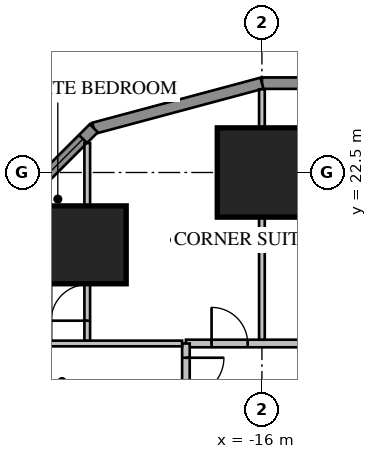
"""IFC4 building model, lengths in metres.
Left out: names, types, materials, properties, quantities, classifications, styles, units other than length and angle.
Written with IfcOpenShell. Run it as: python <this file> out.ifc"""

import sys

from ifc_helpers import new_model, si_unit, direction, frame, frame_2d, origin, origin_2d, place, context, subcontext, project, spatial, rectangle, extrude, element, fill, save


model = new_model("IFC4")
c1 = context("Model", 3, precision=1e-05, world=origin(), true_north=direction((0.0, 1.0)))
c2 = subcontext(c1, "Body", "Model", "MODEL_VIEW")
j1 = project(units=[si_unit("LENGTHUNIT", "METRE"), si_unit("PLANEANGLEUNIT", "RADIAN")], contexts=[c1])
p1 = place(None, origin())
s1 = spatial("IfcSite", under=j1, at=p1, CompositionType="ELEMENT")
p2 = place(p1, origin())
s2 = spatial("IfcBuilding", under=s1, at=p2, CompositionType="ELEMENT")
p3 = place(p2, frame((0.0, 0.0, 27.55)))
s3 = spatial("IfcBuildingStorey", under=s2, at=p3, CompositionType="ELEMENT", Elevation=27.55)
p4 = place(p3, frame((-16.0, 22.5, 0.0), z_axis=(0.0, 0.0, 1.0), x_axis=(1.0, 0.0, 0.0)))
e1 = element("IfcColumn", 1, at=p4, inside=s3, PredefinedType="COLUMN", context=c2, shape_type="SweptSolid", body=[
    extrude(rectangle(XDim=2.35, YDim=2.35, at=origin_2d()), origin(), (0.0, 0.0, 1.0), 3.85),
])
p5 = place(p3, frame((-20.596, 20.596, 0.0), z_axis=(0.0, 0.0, 1.0), x_axis=(1.0, 0.0, 0.0)))
e2 = element("IfcColumn", 2, at=p5, inside=s3, PredefinedType="COLUMN", context=c2, shape_type="SweptSolid", body=[
    extrude(rectangle(XDim=2.05, YDim=2.05, at=origin_2d()), origin(), (0.0, 0.0, 1.0), 3.85),
])
p6 = place(p3, frame((16.0, 24.85, 0.0), z_axis=(0.0, 0.0, 1.0), x_axis=(-1.0, 0.0, 0.0)))
e3 = element("IfcWall", 3, at=p6, inside=s3, PredefinedType="SOLIDWALL", context=c2, shape_type="SweptSolid", body=[
    extrude(rectangle(XDim=32.0, YDim=0.3, at=frame_2d((16.0, 0.0))), origin(), (0.0, 0.0, 1.0), 3.65),
])
p7 = place(p6, frame((1.2, 0.0, 0.75)))
e4 = element("IfcOpeningElement", 4, at=p7, cuts=e3, PredefinedType="OPENING", context=c2, shape_type="SweptSolid", body=[
    extrude(rectangle(XDim=1.6, YDim=1.8, at=frame_2d((0.8, 0.9))), frame((0.0, 0.17, 0.0), z_axis=(0.0, -1.0, 0.0), x_axis=(1.0, 0.0, 0.0)), (0.0, 0.0, 1.0), 0.34),
])
p8 = place(p6, frame((5.2, 0.0, 0.75)))
e5 = element("IfcOpeningElement", 5, at=p8, cuts=e3, PredefinedType="OPENING", context=c2, shape_type="SweptSolid", body=[
    extrude(rectangle(XDim=1.6, YDim=1.8, at=frame_2d((0.8, 0.9))), frame((0.0, 0.17, 0.0), z_axis=(0.0, -1.0, 0.0), x_axis=(1.0, 0.0, 0.0)), (0.0, 0.0, 1.0), 0.34),
])
p9 = place(p6, frame((17.2, 0.0, 0.75)))
e6 = element("IfcOpeningElement", 6, at=p9, cuts=e3, PredefinedType="OPENING", context=c2, shape_type="SweptSolid", body=[
    extrude(rectangle(XDim=1.6, YDim=1.8, at=frame_2d((0.8, 0.9))), frame((0.0, 0.17, 0.0), z_axis=(0.0, -1.0, 0.0), x_axis=(1.0, 0.0, 0.0)), (0.0, 0.0, 1.0), 0.34),
])
p10 = place(p6, frame((21.2, 0.0, 0.75)))
e7 = element("IfcOpeningElement", 7, at=p10, cuts=e3, PredefinedType="OPENING", context=c2, shape_type="SweptSolid", body=[
    extrude(rectangle(XDim=1.6, YDim=1.8, at=frame_2d((0.8, 0.9))), frame((0.0, 0.17, 0.0), z_axis=(0.0, -1.0, 0.0), x_axis=(1.0, 0.0, 0.0)), (0.0, 0.0, 1.0), 0.34),
])
p11 = place(p6, frame((25.2, 0.0, 0.75)))
e8 = element("IfcOpeningElement", 8, at=p11, cuts=e3, PredefinedType="OPENING", context=c2, shape_type="SweptSolid", body=[
    extrude(rectangle(XDim=1.6, YDim=1.8, at=frame_2d((0.8, 0.9))), frame((0.0, 0.17, 0.0), z_axis=(0.0, -1.0, 0.0), x_axis=(1.0, 0.0, 0.0)), (0.0, 0.0, 1.0), 0.34),
])
p12 = place(p6, frame((29.2, 0.0, 0.75)))
e9 = element("IfcOpeningElement", 9, at=p12, cuts=e3, PredefinedType="OPENING", context=c2, shape_type="SweptSolid", body=[
    extrude(rectangle(XDim=1.6, YDim=1.8, at=frame_2d((0.8, 0.9))), frame((0.0, 0.17, 0.0), z_axis=(0.0, -1.0, 0.0), x_axis=(1.0, 0.0, 0.0)), (0.0, 0.0, 1.0), 0.34),
])
p13 = place(p6, frame((8.8, 0.0, 0.75)))
e10 = element("IfcOpeningElement", 10, at=p13, cuts=e3, PredefinedType="OPENING", context=c2, shape_type="SweptSolid", body=[
    extrude(rectangle(XDim=2.4, YDim=1.8, at=frame_2d((1.2, 0.9))), frame((0.0, 0.17, 0.0), z_axis=(0.0, -1.0, 0.0), x_axis=(1.0, 0.0, 0.0)), (0.0, 0.0, 1.0), 0.34),
])
p14 = place(p6, frame((13.812, 0.0, 0.0)))
e11 = element("IfcOpeningElement", 11, at=p14, cuts=e3, PredefinedType="OPENING", context=c2, shape_type="SweptSolid", body=[
    extrude(rectangle(XDim=1.0, YDim=2.4, at=frame_2d((0.5, 1.2))), frame((0.0, 0.17, 0.0), z_axis=(0.0, -1.0, 0.0), x_axis=(1.0, 0.0, 0.0)), (0.0, 0.0, 1.0), 0.34),
])
p15 = place(p3, frame((-16.0, 24.85, 0.0), z_axis=(0.0, 0.0, 1.0), x_axis=(-0.965920218567, -0.258839972501, 0.0)))
e12 = element("IfcWall", 12, at=p15, inside=s3, PredefinedType="SOLIDWALL", context=c2, shape_type="SweptSolid", body=[
    extrude(rectangle(XDim=4.581, YDim=0.3, at=frame_2d((2.291, 0.0))), origin(), (0.0, 0.0, 1.0), 3.65),
])
p16 = place(p3, frame((-20.425, 23.664, 0.0), z_axis=(0.0, 0.0, 1.0), x_axis=(-0.707106781187, -0.707106781187, 0.0)))
e13 = element("IfcWall", 13, at=p16, inside=s3, PredefinedType="SOLIDWALL", context=c2, shape_type="SweptSolid", body=[
    extrude(rectangle(XDim=4.581, YDim=0.3, at=frame_2d((2.291, 0.0))), origin(), (0.0, 0.0, 1.0), 3.65),
])
p17 = place(p16, frame((0.4, 0.0, 0.75)))
e14 = element("IfcOpeningElement", 14, at=p17, cuts=e13, PredefinedType="OPENING", context=c2, shape_type="SweptSolid", body=[
    extrude(rectangle(XDim=3.781, YDim=1.8, at=frame_2d((1.891, 0.9))), frame((0.0, 0.17, 0.0), z_axis=(0.0, -1.0, 0.0), x_axis=(1.0, 0.0, 0.0)), (0.0, 0.0, 1.0), 0.34),
])
p18 = place(p3, frame((18.0, 18.0, 0.0), z_axis=(0.0, 0.0, 1.0), x_axis=(-1.0, 0.0, 0.0)))
e15 = element("IfcWall", 15, at=p18, inside=s3, PredefinedType="PARTITIONING", context=c2, shape_type="SweptSolid", body=[
    extrude(rectangle(XDim=36.0, YDim=0.2, at=frame_2d((18.0, 0.0))), origin(), (0.0, 0.0, 1.0), 3.65),
])
p19 = place(p18, frame((0.375, 0.0, 0.0)))
e16 = element("IfcOpeningElement", 16, at=p19, cuts=e15, PredefinedType="OPENING", context=c2, shape_type="SweptSolid", body=[
    extrude(rectangle(XDim=1.0, YDim=2.1, at=frame_2d((0.5, 1.05))), frame((0.0, 0.12, 0.0), z_axis=(0.0, -1.0, 0.0), x_axis=(1.0, 0.0, 0.0)), (0.0, 0.0, 1.0), 0.24),
])
p20 = place(p18, frame((3.8, 0.0, 0.0)))
e17 = element("IfcOpeningElement", 17, at=p20, cuts=e15, PredefinedType="OPENING", context=c2, shape_type="SweptSolid", body=[
    extrude(rectangle(XDim=0.95, YDim=2.1, at=frame_2d((0.475, 1.05))), frame((0.0, 0.12, 0.0), z_axis=(0.0, -1.0, 0.0), x_axis=(1.0, 0.0, 0.0)), (0.0, 0.0, 1.0), 0.24),
])
p21 = place(p18, frame((7.8, 0.0, 0.0)))
e18 = element("IfcOpeningElement", 18, at=p21, cuts=e15, PredefinedType="OPENING", context=c2, shape_type="SweptSolid", body=[
    extrude(rectangle(XDim=0.95, YDim=2.1, at=frame_2d((0.475, 1.05))), frame((0.0, 0.12, 0.0), z_axis=(0.0, -1.0, 0.0), x_axis=(1.0, 0.0, 0.0)), (0.0, 0.0, 1.0), 0.24),
])
p22 = place(p18, frame((19.8, 0.0, 0.0)))
e19 = element("IfcOpeningElement", 19, at=p22, cuts=e15, PredefinedType="OPENING", context=c2, shape_type="SweptSolid", body=[
    extrude(rectangle(XDim=0.95, YDim=2.1, at=frame_2d((0.475, 1.05))), frame((0.0, 0.12, 0.0), z_axis=(0.0, -1.0, 0.0), x_axis=(1.0, 0.0, 0.0)), (0.0, 0.0, 1.0), 0.24),
])
p23 = place(p18, frame((23.8, 0.0, 0.0)))
e20 = element("IfcOpeningElement", 20, at=p23, cuts=e15, PredefinedType="OPENING", context=c2, shape_type="SweptSolid", body=[
    extrude(rectangle(XDim=0.95, YDim=2.1, at=frame_2d((0.475, 1.05))), frame((0.0, 0.12, 0.0), z_axis=(0.0, -1.0, 0.0), x_axis=(1.0, 0.0, 0.0)), (0.0, 0.0, 1.0), 0.24),
])
p24 = place(p18, frame((27.8, 0.0, 0.0)))
e21 = element("IfcOpeningElement", 21, at=p24, cuts=e15, PredefinedType="OPENING", context=c2, shape_type="SweptSolid", body=[
    extrude(rectangle(XDim=0.95, YDim=2.1, at=frame_2d((0.475, 1.05))), frame((0.0, 0.12, 0.0), z_axis=(0.0, -1.0, 0.0), x_axis=(1.0, 0.0, 0.0)), (0.0, 0.0, 1.0), 0.24),
])
p25 = place(p18, frame((31.8, 0.0, 0.0)))
e22 = element("IfcOpeningElement", 22, at=p25, cuts=e15, PredefinedType="OPENING", context=c2, shape_type="SweptSolid", body=[
    extrude(rectangle(XDim=0.95, YDim=2.1, at=frame_2d((0.475, 1.05))), frame((0.0, 0.12, 0.0), z_axis=(0.0, -1.0, 0.0), x_axis=(1.0, 0.0, 0.0)), (0.0, 0.0, 1.0), 0.24),
])
p26 = place(p18, frame((34.375, 0.0, 0.0)))
e23 = element("IfcOpeningElement", 23, at=p26, cuts=e15, PredefinedType="OPENING", context=c2, shape_type="SweptSolid", body=[
    extrude(rectangle(XDim=0.95, YDim=2.1, at=frame_2d((0.475, 1.05))), frame((0.0, 0.12, 0.0), z_axis=(0.0, -1.0, 0.0), x_axis=(1.0, 0.0, 0.0)), (0.0, 0.0, 1.0), 0.24),
])
p27 = place(p18, frame((11.2, 0.0, 0.0)))
e24 = element("IfcOpeningElement", 24, at=p27, cuts=e15, PredefinedType="OPENING", context=c2, shape_type="SweptSolid", body=[
    extrude(rectangle(XDim=1.0, YDim=2.1, at=frame_2d((0.5, 1.05))), frame((0.0, 0.12, 0.0), z_axis=(0.0, -1.0, 0.0), x_axis=(1.0, 0.0, 0.0)), (0.0, 0.0, 1.0), 0.24),
])
p28 = place(p3, frame((-16.0, 18.1, 0.0), z_axis=(0.0, 0.0, 1.0), x_axis=(0.0, 1.0, 0.0)))
e25 = element("IfcWall", 25, at=p28, inside=s3, PredefinedType="PARTITIONING", context=c2, shape_type="SweptSolid", body=[
    extrude(rectangle(XDim=6.589, YDim=0.15, at=frame_2d((3.295, 0.0))), origin(), (0.0, 0.0, 1.0), 3.65),
])
p29 = place(p3, frame((-20.596, 18.065, 0.0), z_axis=(0.0, 0.0, 1.0), x_axis=(0.0, 1.0, 0.0)))
e26 = element("IfcWall", 26, at=p29, inside=s3, PredefinedType="PARTITIONING", context=c2, shape_type="SweptSolid", body=[
    extrude(rectangle(XDim=5.209, YDim=0.15, at=frame_2d((2.604, 0.0))), origin(), (0.0, 0.0, 1.0), 3.65),
])
p30 = place(p29, frame((0.535, 0.0, 0.0)))
e27 = element("IfcOpeningElement", 27, at=p30, cuts=e26, PredefinedType="OPENING", context=c2, shape_type="SweptSolid", body=[
    extrude(rectangle(XDim=0.95, YDim=2.1, at=frame_2d((0.475, 1.05))), frame((0.0, 0.095, 0.0), z_axis=(0.0, -1.0, 0.0), x_axis=(1.0, 0.0, 0.0)), (0.0, 0.0, 1.0), 0.19),
])
p31 = place(p3, frame((-18.0, 18.0, 0.0), z_axis=(0.0, 0.0, 1.0), x_axis=(0.0, -1.0, 0.0)))
e28 = element("IfcWall", 28, at=p31, inside=s3, PredefinedType="PARTITIONING", context=c2, shape_type="SweptSolid", body=[
    extrude(rectangle(XDim=36.0, YDim=0.2, at=frame_2d((18.0, 0.0))), origin(), (0.0, 0.0, 1.0), 3.65),
])
p32 = place(p31, frame((10.4, 0.0, 0.0)))
e29 = element("IfcOpeningElement", 29, at=p32, cuts=e28, PredefinedType="OPENING", context=c2, shape_type="SweptSolid", body=[
    extrude(rectangle(XDim=1.0, YDim=2.1, at=frame_2d((0.5, 1.05))), frame((0.0, 0.12, 0.0), z_axis=(0.0, -1.0, 0.0), x_axis=(1.0, 0.0, 0.0)), (0.0, 0.0, 1.0), 0.24),
])
p33 = place(p31, frame((14.4, 0.0, 0.0)))
e30 = element("IfcOpeningElement", 30, at=p33, cuts=e28, PredefinedType="OPENING", context=c2, shape_type="SweptSolid", body=[
    extrude(rectangle(XDim=1.0, YDim=2.1, at=frame_2d((0.5, 1.05))), frame((0.0, 0.12, 0.0), z_axis=(0.0, -1.0, 0.0), x_axis=(1.0, 0.0, 0.0)), (0.0, 0.0, 1.0), 0.24),
])
p34 = place(p31, frame((0.375, 0.0, 0.0)))
e31 = element("IfcOpeningElement", 31, at=p34, cuts=e28, PredefinedType="OPENING", context=c2, shape_type="SweptSolid", body=[
    extrude(rectangle(XDim=1.0, YDim=2.1, at=frame_2d((0.5, 1.05))), frame((0.0, 0.12, 0.0), z_axis=(0.0, -1.0, 0.0), x_axis=(1.0, 0.0, 0.0)), (0.0, 0.0, 1.0), 0.24),
])
p35 = place(p31, frame((34.375, 0.0, 0.0)))
e32 = element("IfcOpeningElement", 32, at=p35, cuts=e28, PredefinedType="OPENING", context=c2, shape_type="SweptSolid", body=[
    extrude(rectangle(XDim=0.95, YDim=2.1, at=frame_2d((0.475, 1.05))), frame((0.0, 0.12, 0.0), z_axis=(0.0, -1.0, 0.0), x_axis=(1.0, 0.0, 0.0)), (0.0, 0.0, 1.0), 0.24),
])
p36 = place(p3, frame((-18.1, 18.0, 0.0), z_axis=(0.0, 0.0, 1.0), x_axis=(-1.0, 0.0, 0.0)))
e33 = element("IfcWall", 33, at=p36, inside=s3, PredefinedType="PARTITIONING", context=c2, shape_type="SweptSolid", body=[
    extrude(rectangle(XDim=6.053, YDim=0.15, at=frame_2d((3.027, 0.0))), origin(), (0.0, 0.0, 1.0), 3.65),
])
p37 = place(p3, frame((-13.625, 20.75, 0.0), z_axis=(0.0, 0.0, 1.0), x_axis=(-1.0, 0.0, 0.0)))
e34 = element("IfcWall", 34, at=p37, inside=s3, PredefinedType="PARTITIONING", context=c2, shape_type="SweptSolid", body=[
    extrude(rectangle(XDim=2.3, YDim=0.1, at=frame_2d((1.15, 0.0))), origin(), (0.0, 0.0, 1.0), 3.65),
])
p38 = place(p37, frame((0.2, 0.0, 0.0)))
e35 = element("IfcOpeningElement", 35, at=p38, cuts=e34, PredefinedType="OPENING", context=c2, shape_type="SweptSolid", body=[
    extrude(rectangle(XDim=0.9, YDim=2.1, at=frame_2d((0.45, 1.05))), frame((0.0, 0.07, 0.0), z_axis=(0.0, -1.0, 0.0), x_axis=(1.0, 0.0, 0.0)), (0.0, 0.0, 1.0), 0.14),
])
p39 = place(p17, origin())
e36 = element("IfcWindow", 36, at=p39, inside=s3, PartitioningType="SINGLE_PANEL", PredefinedType="WINDOW", context=c2, shape_type="SweptSolid", body=[
    extrude(rectangle(XDim=3.781, YDim=1.8, at=frame_2d((1.891, 0.9))), frame((0.0, 0.03, 0.0), z_axis=(0.0, -1.0, 0.0), x_axis=(1.0, 0.0, 0.0)), (0.0, 0.0, 1.0), 0.06),
])
fill(e14, e36)
p40 = place(p26, origin())
e37 = element("IfcDoor", 37, at=p40, inside=s3, OperationType="SINGLE_SWING_RIGHT", PredefinedType="DOOR", context=c2, shape_type="SweptSolid", body=[
    extrude(rectangle(XDim=0.95, YDim=2.1, at=frame_2d((0.475, 1.05))), frame((0.0, 0.025, 0.0), z_axis=(0.0, -1.0, 0.0), x_axis=(1.0, 0.0, 0.0)), (0.0, 0.0, 1.0), 0.05),
])
fill(e23, e37)
p41 = place(p30, origin())
e38 = element("IfcDoor", 38, at=p41, inside=s3, OperationType="SINGLE_SWING_LEFT", PredefinedType="DOOR", context=c2, shape_type="SweptSolid", body=[
    extrude(rectangle(XDim=0.95, YDim=2.1, at=frame_2d((0.475, 1.05))), frame((0.0, 0.025, 0.0), z_axis=(0.0, -1.0, 0.0), x_axis=(1.0, 0.0, 0.0)), (0.0, 0.0, 1.0), 0.05),
])
fill(e27, e38)
p42 = place(p34, origin())
e39 = element("IfcDoor", 39, at=p42, inside=s3, OperationType="SINGLE_SWING_LEFT", PredefinedType="DOOR", context=c2, shape_type="SweptSolid", body=[
    extrude(rectangle(XDim=1.0, YDim=2.1, at=frame_2d((0.5, 1.05))), frame((0.0, 0.025, 0.0), z_axis=(0.0, -1.0, 0.0), x_axis=(1.0, 0.0, 0.0)), (0.0, 0.0, 1.0), 0.05),
])
fill(e31, e39)
save(model, sys.argv[1])
